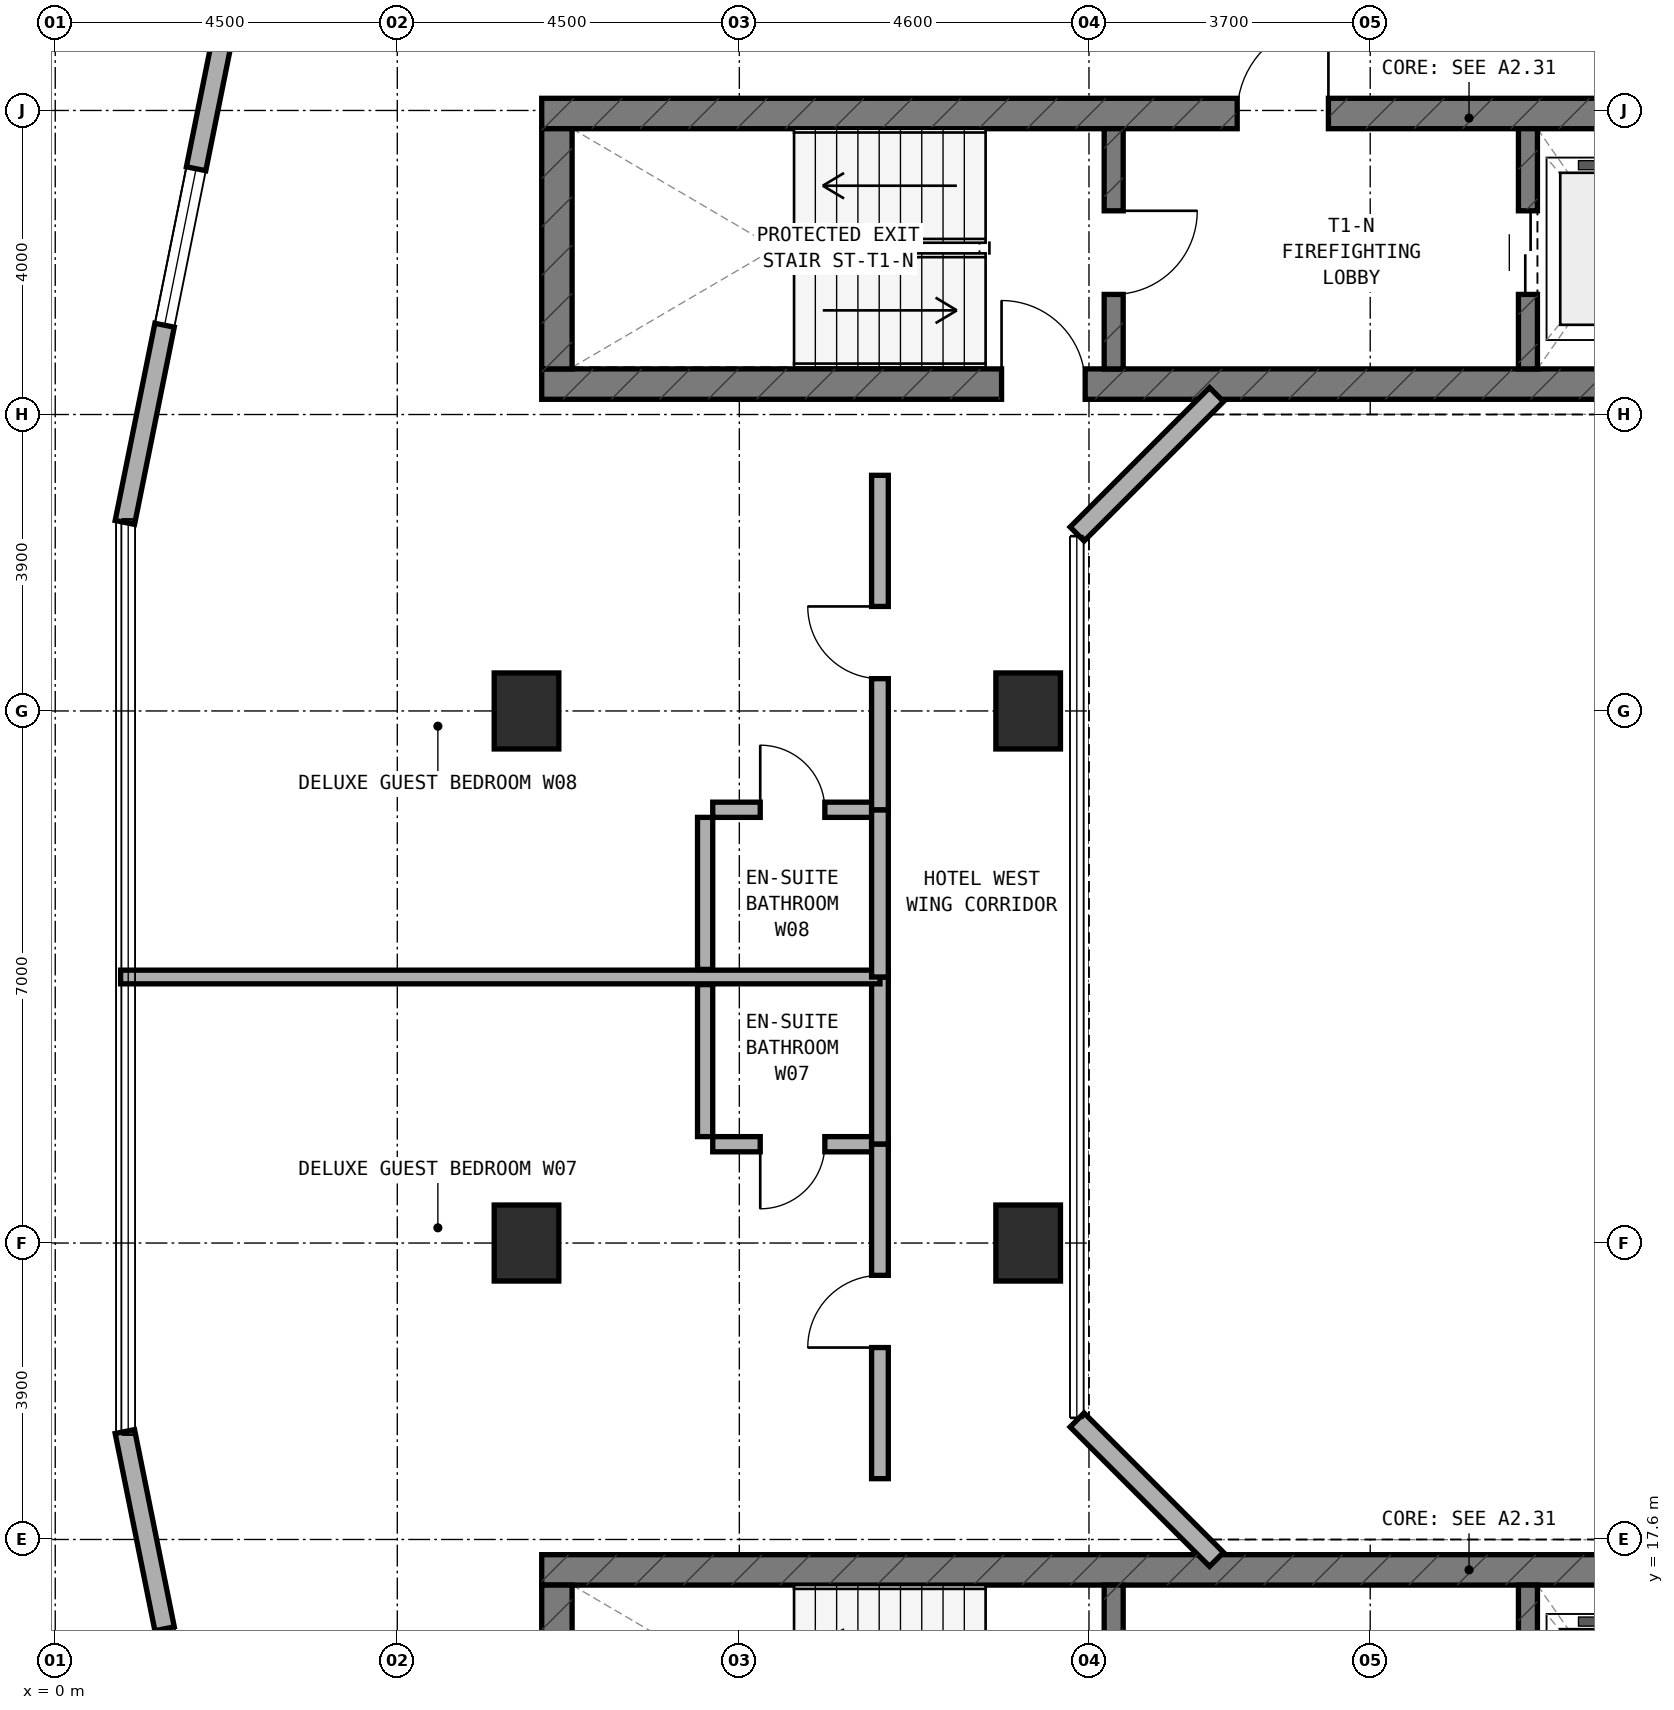
"""IFC4 building model, lengths in metres.
Left out: names, types, materials, properties, quantities, classifications, styles, units other than length and angle.
Written with IfcOpenShell. Run it as: python <this file> out.ifc"""

import sys

from ifc_helpers import new_model, si_unit, direction, frame, frame_2d, origin, origin_2d, place, context, subcontext, project, spatial, rectangle, extrude, element, fill, save


model = new_model("IFC4")
c1 = context("Model", 3, precision=1e-05, world=origin(), true_north=direction((0.0, 1.0)))
c2 = subcontext(c1, "Body", "Model", "MODEL_VIEW")
j1 = project(units=[si_unit("LENGTHUNIT", "METRE"), si_unit("PLANEANGLEUNIT", "RADIAN")], contexts=[c1])
p1 = place(None, origin())
s1 = spatial("IfcSite", under=j1, at=p1, CompositionType="ELEMENT")
p2 = place(p1, origin())
s2 = spatial("IfcBuilding", under=s1, at=p2, CompositionType="ELEMENT")
p3 = place(p2, frame((0.0, 0.0, 134.5)))
s3 = spatial("IfcBuildingStorey", under=s2, at=p3, CompositionType="ELEMENT", Elevation=134.5)
p4 = place(p3, frame((6.4, 32.8, 0.0), z_axis=(0.0, 0.0, 1.0), x_axis=(1.0, 0.0, 0.0)))
e1 = element("IfcWall", 1, at=p4, inside=s3, PredefinedType="SHEAR", context=c2, shape_type="SweptSolid", body=[
    extrude(rectangle(XDim=24.4, YDim=0.4, at=frame_2d((12.2, 0.0))), origin(), (0.0, 0.0, 1.0), 3.5),
])
p5 = place(p4, frame((6.05, 0.0, 0.0)))
e2 = element("IfcOpeningElement", 2, at=p5, cuts=e1, PredefinedType="OPENING", context=c2, shape_type="SweptSolid", body=[
    extrude(rectangle(XDim=1.1, YDim=2.15, at=frame_2d((0.55, 1.075))), frame((0.0, 0.21, 0.0), z_axis=(0.0, -1.0, 0.0), x_axis=(1.0, 0.0, 0.0)), (0.0, 0.0, 1.0), 0.42),
])
p6 = place(p3, frame((6.4, 36.36, 0.0), z_axis=(0.0, 0.0, 1.0), x_axis=(1.0, 0.0, 0.0)))
e3 = element("IfcWall", 3, at=p6, inside=s3, PredefinedType="SHEAR", context=c2, shape_type="SweptSolid", body=[
    extrude(rectangle(XDim=24.4, YDim=0.4, at=frame_2d((12.2, 0.0))), origin(), (0.0, 0.0, 1.0), 3.5),
])
p7 = place(p6, frame((9.15, 0.0, 0.0)))
e4 = element("IfcOpeningElement", 4, at=p7, cuts=e3, PredefinedType="OPENING", context=c2, shape_type="SweptSolid", body=[
    extrude(rectangle(XDim=1.2, YDim=2.15, at=frame_2d((0.6, 1.075))), frame((0.0, 0.21, 0.0), z_axis=(0.0, -1.0, 0.0), x_axis=(1.0, 0.0, 0.0)), (0.0, 0.0, 1.0), 0.42),
])
p8 = place(p6, frame((19.2, 0.0, 0.0)))
e5 = element("IfcOpeningElement", 5, at=p8, cuts=e3, PredefinedType="OPENING", context=c2, shape_type="SweptSolid", body=[
    extrude(rectangle(XDim=0.85, YDim=2.1, at=frame_2d((0.425, 1.05))), frame((0.0, 0.21, 0.0), z_axis=(0.0, -1.0, 0.0), x_axis=(1.0, 0.0, 0.0)), (0.0, 0.0, 1.0), 0.42),
])
p9 = place(p6, frame((16.94, 0.0, 0.0)))
e6 = element("IfcOpeningElement", 6, at=p9, cuts=e3, PredefinedType="OPENING", context=c2, shape_type="SweptSolid", body=[
    extrude(rectangle(XDim=0.85, YDim=2.1, at=frame_2d((0.425, 1.05))), frame((0.0, 0.21, 0.0), z_axis=(0.0, -1.0, 0.0), x_axis=(1.0, 0.0, 0.0)), (0.0, 0.0, 1.0), 0.42),
])
p10 = place(p3, frame((6.6, 33.0, 0.0), z_axis=(0.0, 0.0, 1.0), x_axis=(0.0, 1.0, 0.0)))
e7 = element("IfcWall", 7, at=p10, inside=s3, PredefinedType="SHEAR", context=c2, shape_type="SweptSolid", body=[
    extrude(rectangle(XDim=3.16, YDim=0.4, at=frame_2d((1.58, 0.0))), origin(), (0.0, 0.0, 1.0), 3.5),
])
p11 = place(p3, frame((13.925, 33.0, 0.0), z_axis=(0.0, 0.0, 1.0), x_axis=(0.0, 1.0, 0.0)))
e8 = element("IfcWall", 8, at=p11, inside=s3, PredefinedType="STANDARD", context=c2, shape_type="SweptSolid", body=[
    extrude(rectangle(XDim=3.16, YDim=0.25, at=frame_2d((1.58, 0.0))), origin(), (0.0, 0.0, 1.0), 3.22),
])
p12 = place(p11, frame((0.98, 0.0, 0.0)))
e9 = element("IfcOpeningElement", 9, at=p12, cuts=e8, PredefinedType="OPENING", context=c2, shape_type="SweptSolid", body=[
    extrude(rectangle(XDim=1.1, YDim=2.15, at=frame_2d((0.55, 1.075))), frame((0.0, 0.135, 0.0), z_axis=(0.0, -1.0, 0.0), x_axis=(1.0, 0.0, 0.0)), (0.0, 0.0, 1.0), 0.27),
])
p13 = place(p3, frame((19.375, 33.0, 0.0), z_axis=(0.0, 0.0, 1.0), x_axis=(0.0, 1.0, 0.0)))
e10 = element("IfcWall", 10, at=p13, inside=s3, PredefinedType="STANDARD", context=c2, shape_type="SweptSolid", body=[
    extrude(rectangle(XDim=3.16, YDim=0.25, at=frame_2d((1.58, 0.0))), origin(), (0.0, 0.0, 1.0), 3.22),
])
p14 = place(p13, frame((0.98, 0.0, 0.0)))
e11 = element("IfcOpeningElement", 11, at=p14, cuts=e10, PredefinedType="OPENING", context=c2, shape_type="SweptSolid", body=[
    extrude(rectangle(XDim=1.1, YDim=2.15, at=frame_2d((0.55, 1.075))), frame((0.0, 0.135, 0.0), z_axis=(0.0, -1.0, 0.0), x_axis=(1.0, 0.0, 0.0)), (0.0, 0.0, 1.0), 0.27),
])
p15 = place(p3, frame((6.4, 17.2, 0.0), z_axis=(0.0, 0.0, 1.0), x_axis=(1.0, 0.0, 0.0)))
e12 = element("IfcWall", 12, at=p15, inside=s3, PredefinedType="SHEAR", context=c2, shape_type="SweptSolid", body=[
    extrude(rectangle(XDim=24.4, YDim=0.4, at=frame_2d((12.2, 0.0))), origin(), (0.0, 0.0, 1.0), 3.5),
])
p16 = place(p3, frame((6.6, 13.84, 0.0), z_axis=(0.0, 0.0, 1.0), x_axis=(0.0, 1.0, 0.0)))
e13 = element("IfcWall", 13, at=p16, inside=s3, PredefinedType="SHEAR", context=c2, shape_type="SweptSolid", body=[
    extrude(rectangle(XDim=3.16, YDim=0.4, at=frame_2d((1.58, 0.0))), origin(), (0.0, 0.0, 1.0), 3.5),
])
p17 = place(p3, frame((13.925, 13.84, 0.0), z_axis=(0.0, 0.0, 1.0), x_axis=(0.0, 1.0, 0.0)))
e14 = element("IfcWall", 14, at=p17, inside=s3, PredefinedType="STANDARD", context=c2, shape_type="SweptSolid", body=[
    extrude(rectangle(XDim=3.16, YDim=0.25, at=frame_2d((1.58, 0.0))), origin(), (0.0, 0.0, 1.0), 3.22),
])
p18 = place(p17, frame((0.98, 0.0, 0.0)))
e15 = element("IfcOpeningElement", 15, at=p18, cuts=e14, PredefinedType="OPENING", context=c2, shape_type="SweptSolid", body=[
    extrude(rectangle(XDim=1.1, YDim=2.15, at=frame_2d((0.55, 1.075))), frame((0.0, 0.135, 0.0), z_axis=(0.0, -1.0, 0.0), x_axis=(1.0, 0.0, 0.0)), (0.0, 0.0, 1.0), 0.27),
])
p19 = place(p3, frame((19.375, 13.84, 0.0), z_axis=(0.0, 0.0, 1.0), x_axis=(0.0, 1.0, 0.0)))
e16 = element("IfcWall", 16, at=p19, inside=s3, PredefinedType="STANDARD", context=c2, shape_type="SweptSolid", body=[
    extrude(rectangle(XDim=3.16, YDim=0.25, at=frame_2d((1.58, 0.0))), origin(), (0.0, 0.0, 1.0), 3.22),
])
p20 = place(p19, frame((0.98, 0.0, 0.0)))
e17 = element("IfcOpeningElement", 17, at=p20, cuts=e16, PredefinedType="OPENING", context=c2, shape_type="SweptSolid", body=[
    extrude(rectangle(XDim=1.1, YDim=2.15, at=frame_2d((0.55, 1.075))), frame((0.0, 0.135, 0.0), z_axis=(0.0, -1.0, 0.0), x_axis=(1.0, 0.0, 0.0)), (0.0, 0.0, 1.0), 0.27),
])
for number, where, z_axis, x_axis in (
    (18, (6.2, 21.5, 0.0), (0.0, 0.0, 1.0), (1.0, 0.0, 0.0)),
    (19, (6.2, 28.5, 0.0), (0.0, 0.0, 1.0), (1.0, 0.0, 0.0)),
    (20, (12.8, 21.5, 0.0), (0.0, 0.0, 1.0), (1.0, 0.0, 0.0)),
    (21, (12.8, 28.5, 0.0), (0.0, 0.0, 1.0), (1.0, 0.0, 0.0)),
):
    element("IfcColumn", number, at=place(p3, frame(where, z_axis=z_axis, x_axis=x_axis)), inside=s3, PredefinedType="COLUMN", context=c2, shape_type="SweptSolid", body=[
        extrude(rectangle(XDim=0.85, YDim=1.0, at=origin_2d()), origin(), (0.0, 0.0, 1.0), 3.5),
    ])
p21 = place(p3, frame((2.729, 39.982, 0.0), z_axis=(0.0, 0.0, 1.0), x_axis=(-0.197435082048, -0.980315963543, 0.0)))
e22 = element("IfcWall", 22, at=p21, inside=s3, PredefinedType="STANDARD", context=c2, shape_type="SweptSolid", body=[
    extrude(rectangle(XDim=9.183, YDim=0.26, at=frame_2d((4.591, 0.0))), origin(), (0.0, 0.0, 1.0), 3.22),
])
p22 = place(p21, frame((4.436, 0.0, 0.85)))
e23 = element("IfcOpeningElement", 23, at=p22, cuts=e22, PredefinedType="OPENING", context=c2, shape_type="SweptSolid", body=[
    extrude(rectangle(XDim=2.1, YDim=1.5, at=frame_2d((1.05, 0.75))), frame((0.0, 0.14, 0.0), z_axis=(0.0, -1.0, 0.0), x_axis=(1.0, 0.0, 0.0)), (0.0, 0.0, 1.0), 0.28),
])
p23 = place(p3, frame((0.916, 19.02, 0.0), z_axis=(0.0, 0.0, 1.0), x_axis=(0.197435082048, -0.980315963543, 0.0)))
e24 = element("IfcWall", 24, at=p23, inside=s3, PredefinedType="STANDARD", context=c2, shape_type="SweptSolid", body=[
    extrude(rectangle(XDim=9.183, YDim=0.26, at=frame_2d((4.591, 0.0))), origin(), (0.0, 0.0, 1.0), 3.22),
])
p24 = place(p23, frame((2.647, 0.0, 0.85)))
e25 = element("IfcOpeningElement", 25, at=p24, cuts=e24, PredefinedType="OPENING", context=c2, shape_type="SweptSolid", body=[
    extrude(rectangle(XDim=2.1, YDim=1.5, at=frame_2d((1.05, 0.75))), frame((0.0, 0.14, 0.0), z_axis=(0.0, -1.0, 0.0), x_axis=(1.0, 0.0, 0.0)), (0.0, 0.0, 1.0), 0.28),
])
for number, where, z_axis, x_axis in (
    (26, (15.278, 32.662, 0.0), (0.0, 0.0, 1.0), (-0.707, -0.707, 0.0)),
    (27, (13.444, 19.172, 0.0), (0.0, 0.0, 1.0), (0.707, -0.707, 0.0)),
):
    element("IfcWall", number, at=place(p3, frame(where, z_axis=z_axis, x_axis=x_axis)), inside=s3, PredefinedType="STANDARD", context=c2, shape_type="SweptSolid", body=[
        extrude(rectangle(XDim=2.594, YDim=0.26, at=frame_2d((1.297, 0.0))), origin(), (0.0, 0.0, 1.0), 3.22),
    ])
p25 = place(p3, frame((8.65, 22.8, 0.0), z_axis=(0.0, 0.0, 1.0), x_axis=(1.0, 0.0, 0.0)))
e28 = element("IfcWall", 28, at=p25, inside=s3, PredefinedType="PLUMBINGWALL", context=c2, shape_type="SweptSolid", body=[
    extrude(rectangle(XDim=2.1, YDim=0.2, at=frame_2d((1.05, 0.0))), origin(), (0.0, 0.0, 1.0), 3.22),
])
p26 = place(p25, frame((0.625, 0.0, 0.0)))
e29 = element("IfcOpeningElement", 29, at=p26, cuts=e28, PredefinedType="OPENING", context=c2, shape_type="SweptSolid", body=[
    extrude(rectangle(XDim=0.85, YDim=2.1, at=frame_2d((0.425, 1.05))), frame((0.0, 0.11, 0.0), z_axis=(0.0, -1.0, 0.0), x_axis=(1.0, 0.0, 0.0)), (0.0, 0.0, 1.0), 0.22),
])
p27 = place(p3, frame((8.55, 22.9, 0.0), z_axis=(0.0, 0.0, 1.0), x_axis=(0.0, 1.0, 0.0)))
e30 = element("IfcWall", 30, at=p27, inside=s3, PredefinedType="PLUMBINGWALL", context=c2, shape_type="SweptSolid", body=[
    extrude(rectangle(XDim=2.0, YDim=0.2, at=frame_2d((1.0, 0.0))), origin(), (0.0, 0.0, 1.0), 3.22),
])
p28 = place(p3, frame((10.85, 22.8, 0.0), z_axis=(0.0, 0.0, 1.0), x_axis=(0.0, 1.0, 0.0)))
e31 = element("IfcWall", 31, at=p28, inside=s3, PredefinedType="SOLIDWALL", context=c2, shape_type="SweptSolid", body=[
    extrude(rectangle(XDim=2.2, YDim=0.22, at=frame_2d((1.1, 0.0))), origin(), (0.0, 0.0, 1.0), 3.22),
])
p29 = place(p3, frame((10.85, 18.4, 0.0), z_axis=(0.0, 0.0, 1.0), x_axis=(0.0, 1.0, 0.0)))
e32 = element("IfcWall", 32, at=p29, inside=s3, PredefinedType="SOLIDWALL", context=c2, shape_type="SweptSolid", body=[
    extrude(rectangle(XDim=4.4, YDim=0.22, at=frame_2d((2.2, 0.0))), origin(), (0.0, 0.0, 1.0), 2.695),
])
p30 = place(p29, frame((1.725, 0.0, 0.0)))
e33 = element("IfcOpeningElement", 33, at=p30, cuts=e32, PredefinedType="OPENING", context=c2, shape_type="SweptSolid", body=[
    extrude(rectangle(XDim=0.95, YDim=2.1, at=frame_2d((0.475, 1.05))), frame((0.0, 0.12, 0.0), z_axis=(0.0, -1.0, 0.0), x_axis=(1.0, 0.0, 0.0)), (0.0, 0.0, 1.0), 0.24),
])
p31 = place(p3, frame((0.86, 25.0, 0.0), z_axis=(0.0, 0.0, 1.0), x_axis=(1.0, 0.0, 0.0)))
e34 = element("IfcWall", 34, at=p31, inside=s3, PredefinedType="SOLIDWALL", context=c2, shape_type="SweptSolid", body=[
    extrude(rectangle(XDim=9.99, YDim=0.18, at=frame_2d((4.995, 0.0))), origin(), (0.0, 0.0, 1.0), 2.835),
])
p32 = place(p3, frame((8.65, 27.2, 0.0), z_axis=(0.0, 0.0, 1.0), x_axis=(1.0, 0.0, 0.0)))
e35 = element("IfcWall", 35, at=p32, inside=s3, PredefinedType="PLUMBINGWALL", context=c2, shape_type="SweptSolid", body=[
    extrude(rectangle(XDim=2.1, YDim=0.2, at=frame_2d((1.05, 0.0))), origin(), (0.0, 0.0, 1.0), 3.22),
])
p33 = place(p32, frame((0.625, 0.0, 0.0)))
e36 = element("IfcOpeningElement", 36, at=p33, cuts=e35, PredefinedType="OPENING", context=c2, shape_type="SweptSolid", body=[
    extrude(rectangle(XDim=0.85, YDim=2.1, at=frame_2d((0.425, 1.05))), frame((0.0, 0.11, 0.0), z_axis=(0.0, -1.0, 0.0), x_axis=(1.0, 0.0, 0.0)), (0.0, 0.0, 1.0), 0.22),
])
p34 = place(p3, frame((8.55, 25.1, 0.0), z_axis=(0.0, 0.0, 1.0), x_axis=(0.0, 1.0, 0.0)))
e37 = element("IfcWall", 37, at=p34, inside=s3, PredefinedType="PLUMBINGWALL", context=c2, shape_type="SweptSolid", body=[
    extrude(rectangle(XDim=2.0, YDim=0.2, at=frame_2d((1.0, 0.0))), origin(), (0.0, 0.0, 1.0), 3.22),
])
p35 = place(p3, frame((10.85, 25.0, 0.0), z_axis=(0.0, 0.0, 1.0), x_axis=(0.0, 1.0, 0.0)))
e38 = element("IfcWall", 38, at=p35, inside=s3, PredefinedType="SOLIDWALL", context=c2, shape_type="SweptSolid", body=[
    extrude(rectangle(XDim=2.2, YDim=0.22, at=frame_2d((1.1, 0.0))), origin(), (0.0, 0.0, 1.0), 3.22),
])
p36 = place(p3, frame((10.85, 27.2, 0.0), z_axis=(0.0, 0.0, 1.0), x_axis=(0.0, 1.0, 0.0)))
e39 = element("IfcWall", 39, at=p36, inside=s3, PredefinedType="SOLIDWALL", context=c2, shape_type="SweptSolid", body=[
    extrude(rectangle(XDim=4.4, YDim=0.22, at=frame_2d((2.2, 0.0))), origin(), (0.0, 0.0, 1.0), 2.695),
])
p37 = place(p36, frame((1.725, 0.0, 0.0)))
e40 = element("IfcOpeningElement", 40, at=p37, cuts=e39, PredefinedType="OPENING", context=c2, shape_type="SweptSolid", body=[
    extrude(rectangle(XDim=0.95, YDim=2.1, at=frame_2d((0.475, 1.05))), frame((0.0, 0.12, 0.0), z_axis=(0.0, -1.0, 0.0), x_axis=(1.0, 0.0, 0.0)), (0.0, 0.0, 1.0), 0.24),
])
p38 = place(p22, origin())
e41 = element("IfcWindow", 41, at=p38, inside=s3, PartitioningType="SINGLE_PANEL", PredefinedType="WINDOW", context=c2, shape_type="SweptSolid", body=[
    extrude(rectangle(XDim=2.1, YDim=1.5, at=frame_2d((1.05, 0.75))), frame((0.0, 0.03, 0.0), z_axis=(0.0, -1.0, 0.0), x_axis=(1.0, 0.0, 0.0)), (0.0, 0.0, 1.0), 0.06),
])
fill(e23, e41)
p39 = place(p24, origin())
e42 = element("IfcWindow", 42, at=p39, inside=s3, PartitioningType="SINGLE_PANEL", PredefinedType="WINDOW", context=c2, shape_type="SweptSolid", body=[
    extrude(rectangle(XDim=2.1, YDim=1.5, at=frame_2d((1.05, 0.75))), frame((0.0, 0.03, 0.0), z_axis=(0.0, -1.0, 0.0), x_axis=(1.0, 0.0, 0.0)), (0.0, 0.0, 1.0), 0.06),
])
fill(e25, e42)
p40 = place(p12, frame((1.1, 0.0, 0.0), z_axis=(0.0, 0.0, 1.0), x_axis=(-1.0, 0.0, 0.0)))
e43 = element("IfcDoor", 43, at=p40, inside=s3, OperationType="SINGLE_SWING_LEFT", PredefinedType="DOOR", context=c2, shape_type="SweptSolid", body=[
    extrude(rectangle(XDim=1.1, YDim=2.15, at=frame_2d((0.55, 1.075))), frame((0.0, 0.025, 0.0), z_axis=(0.0, -1.0, 0.0), x_axis=(1.0, 0.0, 0.0)), (0.0, 0.0, 1.0), 0.05),
])
fill(e9, e43)
p41 = place(p7, origin())
e44 = element("IfcDoor", 44, at=p41, inside=s3, OperationType="SINGLE_SWING_RIGHT", PredefinedType="DOOR", context=c2, shape_type="SweptSolid", body=[
    extrude(rectangle(XDim=1.2, YDim=2.15, at=frame_2d((0.6, 1.075))), frame((0.0, 0.025, 0.0), z_axis=(0.0, -1.0, 0.0), x_axis=(1.0, 0.0, 0.0)), (0.0, 0.0, 1.0), 0.05),
])
fill(e4, e44)
p42 = place(p14, origin())
e45 = element("IfcDoor", 45, at=p42, inside=s3, OperationType="DOUBLE_DOOR_SLIDING", PredefinedType="DOOR", context=c2, shape_type="SweptSolid", body=[
    extrude(rectangle(XDim=1.1, YDim=2.15, at=frame_2d((0.55, 1.075))), frame((0.0, 0.025, 0.0), z_axis=(0.0, -1.0, 0.0), x_axis=(1.0, 0.0, 0.0)), (0.0, 0.0, 1.0), 0.05),
])
fill(e11, e45)
p43 = place(p5, origin())
e46 = element("IfcDoor", 46, at=p43, inside=s3, OperationType="SINGLE_SWING_LEFT", PredefinedType="DOOR", context=c2, shape_type="SweptSolid", body=[
    extrude(rectangle(XDim=1.1, YDim=2.15, at=frame_2d((0.55, 1.075))), frame((0.0, 0.025, 0.0), z_axis=(0.0, -1.0, 0.0), x_axis=(1.0, 0.0, 0.0)), (0.0, 0.0, 1.0), 0.05),
])
fill(e2, e46)
p44 = place(p26, frame((0.85, 0.0, 0.0), z_axis=(0.0, 0.0, 1.0), x_axis=(-1.0, 0.0, 0.0)))
e47 = element("IfcDoor", 47, at=p44, inside=s3, OperationType="SINGLE_SWING_RIGHT", PredefinedType="DOOR", context=c2, shape_type="SweptSolid", body=[
    extrude(rectangle(XDim=0.85, YDim=2.1, at=frame_2d((0.425, 1.05))), frame((0.0, 0.025, 0.0), z_axis=(0.0, -1.0, 0.0), x_axis=(1.0, 0.0, 0.0)), (0.0, 0.0, 1.0), 0.05),
])
fill(e29, e47)
p45 = place(p30, origin())
e48 = element("IfcDoor", 48, at=p45, inside=s3, OperationType="SINGLE_SWING_LEFT", PredefinedType="DOOR", context=c2, shape_type="SweptSolid", body=[
    extrude(rectangle(XDim=0.95, YDim=2.1, at=frame_2d((0.475, 1.05))), frame((0.0, 0.025, 0.0), z_axis=(0.0, -1.0, 0.0), x_axis=(1.0, 0.0, 0.0)), (0.0, 0.0, 1.0), 0.05),
])
fill(e33, e48)
p46 = place(p33, origin())
e49 = element("IfcDoor", 49, at=p46, inside=s3, OperationType="SINGLE_SWING_LEFT", PredefinedType="DOOR", context=c2, shape_type="SweptSolid", body=[
    extrude(rectangle(XDim=0.85, YDim=2.1, at=frame_2d((0.425, 1.05))), frame((0.0, 0.025, 0.0), z_axis=(0.0, -1.0, 0.0), x_axis=(1.0, 0.0, 0.0)), (0.0, 0.0, 1.0), 0.05),
])
fill(e36, e49)
p47 = place(p37, origin())
e50 = element("IfcDoor", 50, at=p47, inside=s3, OperationType="SINGLE_SWING_RIGHT", PredefinedType="DOOR", context=c2, shape_type="SweptSolid", body=[
    extrude(rectangle(XDim=0.95, YDim=2.1, at=frame_2d((0.475, 1.05))), frame((0.0, 0.025, 0.0), z_axis=(0.0, -1.0, 0.0), x_axis=(1.0, 0.0, 0.0)), (0.0, 0.0, 1.0), 0.05),
])
fill(e40, e50)
save(model, sys.argv[1])
